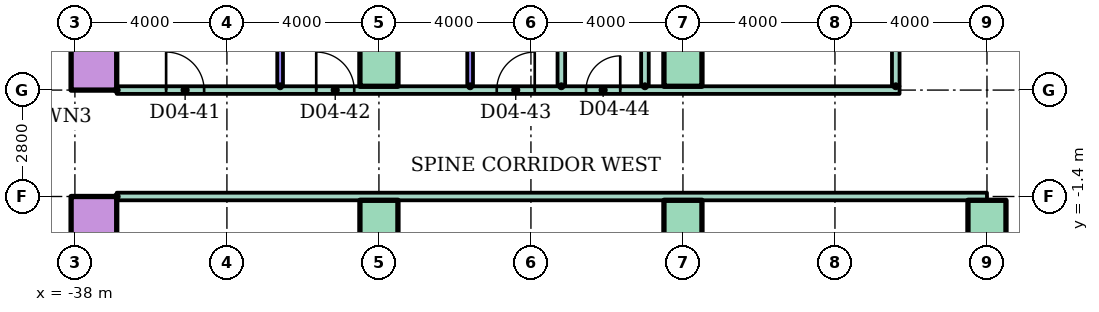
"""IFC4 building model, lengths in metres.
Left out: names, types, materials, properties, quantities, classifications, styles, units other than length and angle.
Written with IfcOpenShell. Run it as: python <this file> out.ifc"""

import sys

from ifc_helpers import new_model, si_unit, direction, frame, frame_2d, origin, origin_2d, place, context, subcontext, project, spatial, rectangle, hollow_rectangle, extrude, element, fill, save


model = new_model("IFC4")
c1 = context("Model", 3, precision=1e-05, world=origin(), true_north=direction((0.0, 1.0)))
c2 = subcontext(c1, "Body", "Model", "MODEL_VIEW")
j1 = project(units=[si_unit("LENGTHUNIT", "METRE"), si_unit("PLANEANGLEUNIT", "RADIAN")], contexts=[c1])
p1 = place(None, origin())
s1 = spatial("IfcSite", under=j1, at=p1, CompositionType="ELEMENT")
p2 = place(p1, origin())
s2 = spatial("IfcBuilding", under=s1, at=p2, CompositionType="ELEMENT")
p3 = place(p2, frame((0.0, 0.0, 18.0)))
s3 = spatial("IfcBuildingStorey", under=s2, at=p3, CompositionType="ELEMENT", Elevation=18.0)
p4 = place(p3, frame((-37.5, -2.0, 0.0)))
e1 = element("IfcColumn", 1, at=p4, inside=s3, PredefinedType="COLUMN", context=c2, shape_type="SweptSolid", body=[
    extrude(hollow_rectangle(XDim=1.2, YDim=1.2, WallThickness=0.06, at=origin_2d()), origin(), (0.0, 0.0, 1.0), 4.0),
])
for number, where in (
    (2, (-30.0, -2.0, 0.0)),
    (3, (-22.0, -2.0, 0.0)),
    (4, (-14.0, -2.0, 0.0)),
):
    element("IfcColumn", number, at=place(p3, frame(where)), inside=s3, PredefinedType="COLUMN", context=c2, shape_type="SweptSolid", body=[
        extrude(rectangle(XDim=1.0, YDim=1.0, at=origin_2d()), origin(), (0.0, 0.0, 1.0), 4.0),
    ])
p5 = place(p3, frame((-37.5, 2.0, 0.0)))
e5 = element("IfcColumn", 5, at=p5, inside=s3, PredefinedType="COLUMN", context=c2, shape_type="SweptSolid", body=[
    extrude(hollow_rectangle(XDim=1.2, YDim=1.2, WallThickness=0.06, at=origin_2d()), origin(), (0.0, 0.0, 1.0), 4.0),
])
for number, where in (
    (6, (-30.0, 2.0, 0.0)),
    (7, (-22.0, 2.0, 0.0)),
):
    element("IfcColumn", number, at=place(p3, frame(where)), inside=s3, PredefinedType="COLUMN", context=c2, shape_type="SweptSolid", body=[
        extrude(rectangle(XDim=1.0, YDim=1.0, at=origin_2d()), origin(), (0.0, 0.0, 1.0), 4.0),
    ])
p6 = place(p3, frame((-36.9, -1.4, 0.0)))
e8 = element("IfcWall", 8, at=p6, inside=s3, PredefinedType="PARTITIONING", context=c2, shape_type="SweptSolid", body=[
    extrude(rectangle(XDim=22.9, YDim=0.2, at=frame_2d((11.45, 0.0))), origin(), (0.0, 0.0, 1.0), 3.7),
])
p7 = place(p3, frame((-36.9, 1.4, 0.0)))
e9 = element("IfcWall", 9, at=p7, inside=s3, PredefinedType="PARTITIONING", context=c2, shape_type="SweptSolid", body=[
    extrude(rectangle(XDim=20.6, YDim=0.2, at=frame_2d((10.3, 0.0))), origin(), (0.0, 0.0, 1.0), 3.7),
])
p8 = place(p7, frame((1.3, 0.0, 0.0)))
e10 = element("IfcOpeningElement", 10, at=p8, cuts=e9, PredefinedType="OPENING", context=c2, shape_type="SweptSolid", body=[
    extrude(rectangle(XDim=1.0, YDim=2.1, at=frame_2d((0.5, 1.05))), frame((0.0, 0.11, 0.0), z_axis=(0.0, -1.0, 0.0), x_axis=(1.0, 0.0, 0.0)), (0.0, 0.0, 1.0), 0.22),
])
p9 = place(p7, frame((5.25, 0.0, 0.0)))
e11 = element("IfcOpeningElement", 11, at=p9, cuts=e9, PredefinedType="OPENING", context=c2, shape_type="SweptSolid", body=[
    extrude(rectangle(XDim=1.0, YDim=2.1, at=frame_2d((0.5, 1.05))), frame((0.0, 0.11, 0.0), z_axis=(0.0, -1.0, 0.0), x_axis=(1.0, 0.0, 0.0)), (0.0, 0.0, 1.0), 0.22),
])
p10 = place(p7, frame((10.0, 0.0, 0.0)))
e12 = element("IfcOpeningElement", 12, at=p10, cuts=e9, PredefinedType="OPENING", context=c2, shape_type="SweptSolid", body=[
    extrude(rectangle(XDim=1.0, YDim=2.1, at=frame_2d((0.5, 1.05))), frame((0.0, 0.11, 0.0), z_axis=(0.0, -1.0, 0.0), x_axis=(1.0, 0.0, 0.0)), (0.0, 0.0, 1.0), 0.22),
])
p11 = place(p7, frame((12.35, 0.0, 0.0)))
e13 = element("IfcOpeningElement", 13, at=p11, cuts=e9, PredefinedType="OPENING", context=c2, shape_type="SweptSolid", body=[
    extrude(rectangle(XDim=0.9, YDim=2.1, at=frame_2d((0.45, 1.05))), frame((0.0, 0.11, 0.0), z_axis=(0.0, -1.0, 0.0), x_axis=(1.0, 0.0, 0.0)), (0.0, 0.0, 1.0), 0.22),
])
for number, where, z_axis, x_axis in (
    (14, (-32.6, 1.5, 0.0), (0.0, 0.0, 1.0), (0.0, 1.0, 0.0)),
    (15, (-27.6, 1.5, 0.0), (0.0, 0.0, 1.0), (0.0, 1.0, 0.0)),
):
    element("IfcWall", number, at=place(p3, frame(where, z_axis=z_axis, x_axis=x_axis)), inside=s3, PredefinedType="PARTITIONING", context=c2, shape_type="SweptSolid", body=[
        extrude(rectangle(XDim=7.0, YDim=0.15, at=frame_2d((3.5, 0.0))), origin(), (0.0, 0.0, 1.0), 3.7),
    ])
for number, where, z_axis, x_axis in (
    (16, (-25.2, 1.5, 0.0), (0.0, 0.0, 1.0), (0.0, 1.0, 0.0)),
    (17, (-23.0, 1.5, 0.0), (0.0, 0.0, 1.0), (0.0, 1.0, 0.0)),
):
    element("IfcWall", number, at=place(p3, frame(where, z_axis=z_axis, x_axis=x_axis)), inside=s3, PredefinedType="PARTITIONING", context=c2, shape_type="SweptSolid", body=[
        extrude(rectangle(XDim=7.0, YDim=0.2, at=frame_2d((3.5, 0.0))), origin(), (0.0, 0.0, 1.0), 3.7),
    ])
p12 = place(p3, frame((-16.4, 1.5, 0.0), z_axis=(0.0, 0.0, 1.0), x_axis=(0.0, 1.0, 0.0)))
e18 = element("IfcWall", 18, at=p12, inside=s3, PredefinedType="PARTITIONING", context=c2, shape_type="SweptSolid", body=[
    extrude(rectangle(XDim=7.0, YDim=0.2, at=frame_2d((3.5, 0.0))), origin(), (0.0, 0.0, 1.0), 3.7),
])
p13 = place(p12, frame((3.0, 0.0, 0.0)))
e19 = element("IfcOpeningElement", 19, at=p13, cuts=e18, PredefinedType="OPENING", context=c2, shape_type="SweptSolid", body=[
    extrude(rectangle(XDim=1.0, YDim=2.1, at=frame_2d((0.5, 1.05))), frame((0.0, 0.11, 0.0), z_axis=(0.0, -1.0, 0.0), x_axis=(1.0, 0.0, 0.0)), (0.0, 0.0, 1.0), 0.22),
])
p14 = place(p8, origin())
e20 = element("IfcDoor", 20, at=p14, inside=s3, OperationType="SINGLE_SWING_LEFT", PredefinedType="DOOR", context=c2, shape_type="SweptSolid", body=[
    extrude(rectangle(XDim=1.0, YDim=2.1, at=frame_2d((0.5, 1.05))), frame((0.0, 0.025, 0.0), z_axis=(0.0, -1.0, 0.0), x_axis=(1.0, 0.0, 0.0)), (0.0, 0.0, 1.0), 0.05),
])
fill(e10, e20)
p15 = place(p9, origin())
e21 = element("IfcDoor", 21, at=p15, inside=s3, OperationType="SINGLE_SWING_LEFT", PredefinedType="DOOR", context=c2, shape_type="SweptSolid", body=[
    extrude(rectangle(XDim=1.0, YDim=2.1, at=frame_2d((0.5, 1.05))), frame((0.0, 0.025, 0.0), z_axis=(0.0, -1.0, 0.0), x_axis=(1.0, 0.0, 0.0)), (0.0, 0.0, 1.0), 0.05),
])
fill(e11, e21)
p16 = place(p10, origin())
e22 = element("IfcDoor", 22, at=p16, inside=s3, OperationType="SINGLE_SWING_RIGHT", PredefinedType="DOOR", context=c2, shape_type="SweptSolid", body=[
    extrude(rectangle(XDim=1.0, YDim=2.1, at=frame_2d((0.5, 1.05))), frame((0.0, 0.025, 0.0), z_axis=(0.0, -1.0, 0.0), x_axis=(1.0, 0.0, 0.0)), (0.0, 0.0, 1.0), 0.05),
])
fill(e12, e22)
p17 = place(p11, origin())
e23 = element("IfcDoor", 23, at=p17, inside=s3, OperationType="SINGLE_SWING_RIGHT", PredefinedType="DOOR", context=c2, shape_type="SweptSolid", body=[
    extrude(rectangle(XDim=0.9, YDim=2.1, at=frame_2d((0.45, 1.05))), frame((0.0, 0.025, 0.0), z_axis=(0.0, -1.0, 0.0), x_axis=(1.0, 0.0, 0.0)), (0.0, 0.0, 1.0), 0.05),
])
fill(e13, e23)
save(model, sys.argv[1])
